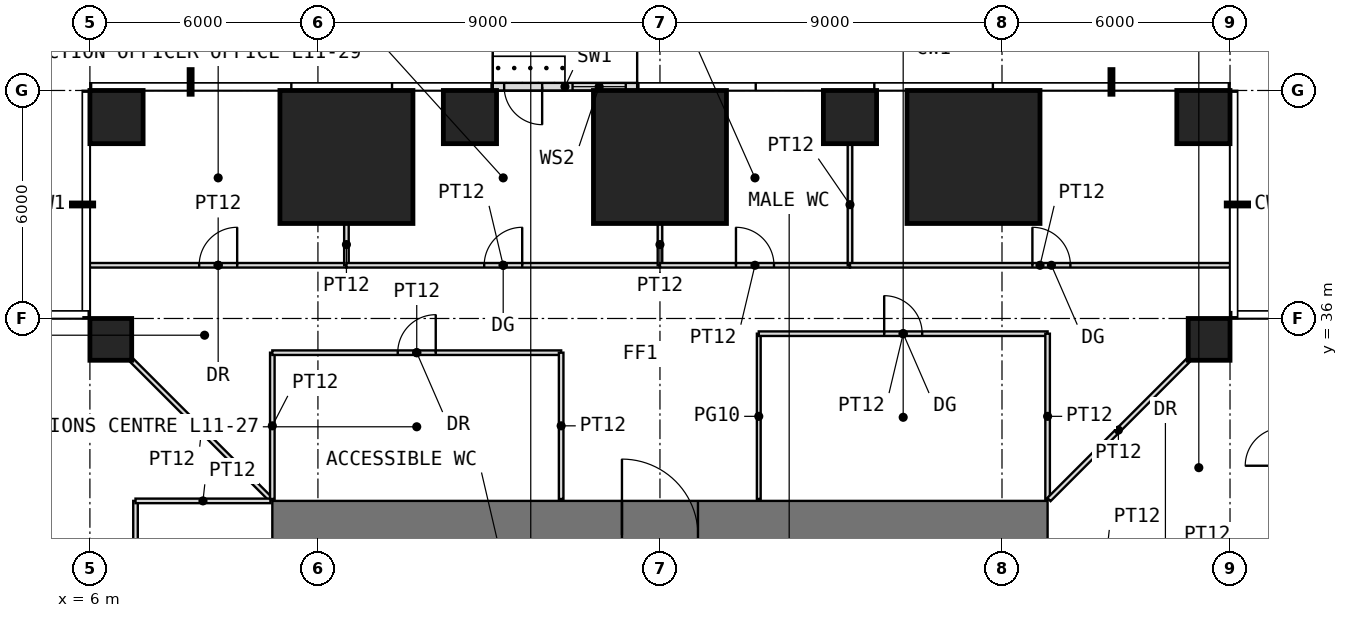
"""IFC4 building model, lengths in metres.
Left out: names, types, materials, properties, quantities, classifications, styles, units other than length and angle.
Written with IfcOpenShell. Run it as: python <this file> out.ifc"""

import sys

from ifc_helpers import new_model, si_unit, direction, frame, frame_2d, origin, origin_2d, place, context, subcontext, project, spatial, rectangle, extrude, element, fill, save


model = new_model("IFC4")
c1 = context("Model", 3, precision=1e-05, world=origin(), true_north=direction((0.0, 1.0)))
c2 = subcontext(c1, "Body", "Model", "MODEL_VIEW")
j1 = project(units=[si_unit("LENGTHUNIT", "METRE"), si_unit("PLANEANGLEUNIT", "RADIAN")], contexts=[c1])
p1 = place(None, origin())
s1 = spatial("IfcSite", under=j1, at=p1, CompositionType="ELEMENT")
p2 = place(p1, origin())
s2 = spatial("IfcBuilding", under=s1, at=p2, CompositionType="ELEMENT")
p3 = place(p2, frame((0.0, 0.0, 50.5)))
s3 = spatial("IfcBuildingStorey", under=s2, at=p3, CompositionType="ELEMENT", Elevation=50.5)
for number, where, z_axis, x_axis in (
    (1, (6.55, 35.45, 0.0), (0.0, 0.0, 1.0), (1.0, 0.0, 0.0)),
    (2, (35.45, 35.45, 0.0), (0.0, 0.0, 1.0), (1.0, 0.0, 0.0)),
):
    element("IfcColumn", number, at=place(p3, frame(where, z_axis=z_axis, x_axis=x_axis)), inside=s3, PredefinedType="COLUMN", context=c2, shape_type="SweptSolid", body=[
        extrude(rectangle(XDim=1.1, YDim=1.1, at=origin_2d()), origin(), (0.0, 0.0, 1.0), 4.0),
    ])
p4 = place(p3, frame((6.7, 41.3, 0.0), z_axis=(0.0, 0.0, 1.0), x_axis=(1.0, 0.0, 0.0)))
e3 = element("IfcColumn", 3, at=p4, inside=s3, PredefinedType="COLUMN", context=c2, shape_type="SweptSolid", body=[
    extrude(rectangle(XDim=1.4, YDim=1.4, at=origin_2d()), origin(), (0.0, 0.0, 1.0), 4.0),
])
p5 = place(p3, frame((12.75, 40.25, 0.0), z_axis=(0.0, 0.0, 1.0), x_axis=(1.0, 0.0, 0.0)))
e4 = element("IfcColumn", 4, at=p5, inside=s3, PredefinedType="COLUMN", context=c2, shape_type="SweptSolid", body=[
    extrude(rectangle(XDim=3.5, YDim=3.5, at=origin_2d()), origin(), (0.0, 0.0, 1.0), 4.0),
])
p6 = place(p3, frame((16.0, 41.3, 0.0), z_axis=(0.0, 0.0, 1.0), x_axis=(1.0, 0.0, 0.0)))
e5 = element("IfcColumn", 5, at=p6, inside=s3, PredefinedType="COLUMN", context=c2, shape_type="SweptSolid", body=[
    extrude(rectangle(XDim=1.4, YDim=1.4, at=origin_2d()), origin(), (0.0, 0.0, 1.0), 4.0),
])
p7 = place(p3, frame((21.0, 40.25, 0.0), z_axis=(0.0, 0.0, 1.0), x_axis=(1.0, 0.0, 0.0)))
e6 = element("IfcColumn", 6, at=p7, inside=s3, PredefinedType="COLUMN", context=c2, shape_type="SweptSolid", body=[
    extrude(rectangle(XDim=3.5, YDim=3.5, at=origin_2d()), origin(), (0.0, 0.0, 1.0), 4.0),
])
p8 = place(p3, frame((26.0, 41.3, 0.0), z_axis=(0.0, 0.0, 1.0), x_axis=(1.0, 0.0, 0.0)))
e7 = element("IfcColumn", 7, at=p8, inside=s3, PredefinedType="COLUMN", context=c2, shape_type="SweptSolid", body=[
    extrude(rectangle(XDim=1.4, YDim=1.4, at=origin_2d()), origin(), (0.0, 0.0, 1.0), 4.0),
])
p9 = place(p3, frame((29.25, 40.25, 0.0), z_axis=(0.0, 0.0, 1.0), x_axis=(1.0, 0.0, 0.0)))
e8 = element("IfcColumn", 8, at=p9, inside=s3, PredefinedType="COLUMN", context=c2, shape_type="SweptSolid", body=[
    extrude(rectangle(XDim=3.5, YDim=3.5, at=origin_2d()), origin(), (0.0, 0.0, 1.0), 4.0),
])
p10 = place(p3, frame((35.3, 41.3, 0.0), z_axis=(0.0, 0.0, 1.0), x_axis=(1.0, 0.0, 0.0)))
e9 = element("IfcColumn", 9, at=p10, inside=s3, PredefinedType="COLUMN", context=c2, shape_type="SweptSolid", body=[
    extrude(rectangle(XDim=1.4, YDim=1.4, at=origin_2d()), origin(), (0.0, 0.0, 1.0), 4.0),
])
p11 = place(p3, frame((20.4, 42.1, 0.0), z_axis=(0.0, 0.0, 1.0), x_axis=(-1.0, 0.0, 0.0)))
e10 = element("IfcWall", 10, at=p11, inside=s3, PredefinedType="USERDEFINED", context=c2, shape_type="SweptSolid", body=[
    extrude(rectangle(XDim=3.8, YDim=0.2, at=frame_2d((1.9, 0.0))), origin(), (0.0, 0.0, 1.0), 3.75),
])
p12 = place(p11, frame((2.5, 0.0, 0.0)))
e11 = element("IfcOpeningElement", 11, at=p12, cuts=e10, PredefinedType="OPENING", context=c2, shape_type="SweptSolid", body=[
    extrude(rectangle(XDim=1.0, YDim=2.4, at=frame_2d((0.5, 1.2))), frame((0.0, 0.11, 0.0), z_axis=(0.0, -1.0, 0.0), x_axis=(1.0, 0.0, 0.0)), (0.0, 0.0, 1.0), 0.22),
])
p13 = place(p11, frame((0.3, 0.0, 0.3)))
e12 = element("IfcOpeningElement", 12, at=p13, cuts=e10, PredefinedType="OPENING", context=c2, shape_type="SweptSolid", body=[
    extrude(rectangle(XDim=1.4, YDim=2.7, at=frame_2d((0.7, 1.35))), frame((0.0, 0.11, 0.0), z_axis=(0.0, -1.0, 0.0), x_axis=(1.0, 0.0, 0.0)), (0.0, 0.0, 1.0), 0.22),
])
p14 = place(p3, frame((10.8, 30.3, -0.05), z_axis=(0.0, 0.0, 1.0), x_axis=(1.0, 0.0, 0.0)))
e13 = element("IfcWall", 13, at=p14, inside=s3, PredefinedType="SHEAR", context=c2, shape_type="SweptSolid", body=[
    extrude(rectangle(XDim=20.4, YDim=1.8, at=frame_2d((10.2, 0.0))), origin(), (0.0, 0.0, 1.0), 4.0),
])
p15 = place(p14, frame((9.2, 0.0, 0.05)))
e14 = element("IfcOpeningElement", 14, at=p15, cuts=e13, PredefinedType="OPENING", context=c2, shape_type="SweptSolid", body=[
    extrude(rectangle(XDim=2.0, YDim=2.2, at=frame_2d((1.0, 1.1))), frame((0.0, 0.91, 0.0), z_axis=(0.0, -1.0, 0.0), x_axis=(1.0, 0.0, 0.0)), (0.0, 0.0, 1.0), 1.82),
])
p16 = place(p3, frame((6.0, 37.4, 0.0), z_axis=(0.0, 0.0, 1.0), x_axis=(1.0, 0.0, 0.0)))
e15 = element("IfcWall", 15, at=p16, inside=s3, PredefinedType="PARTITIONING", context=c2, shape_type="SweptSolid", body=[
    extrude(rectangle(XDim=6.75, YDim=0.12, at=frame_2d((3.375, 0.0))), origin(), (0.0, 0.0, 1.0), 3.75),
])
p17 = place(p16, frame((2.875, 0.0, 0.0)))
e16 = element("IfcOpeningElement", 16, at=p17, cuts=e15, PredefinedType="OPENING", context=c2, shape_type="SweptSolid", body=[
    extrude(rectangle(XDim=1.0, YDim=2.2, at=frame_2d((0.5, 1.1))), frame((0.0, 0.07, 0.0), z_axis=(0.0, -1.0, 0.0), x_axis=(1.0, 0.0, 0.0)), (0.0, 0.0, 1.0), 0.14),
])
p18 = place(p3, frame((7.11, 34.89, 0.0), z_axis=(0.0, 0.0, 1.0), x_axis=(0.707106781187, -0.707106781187, 0.0)))
e17 = element("IfcWall", 17, at=p18, inside=s3, PredefinedType="PARTITIONING", context=c2, shape_type="SweptSolid", body=[
    extrude(rectangle(XDim=5.168, YDim=0.12, at=frame_2d((2.584, 0.0))), origin(), (0.0, 0.0, 1.0), 3.75),
])
p19 = place(p3, frame((7.2, 24.6, 0.0), z_axis=(0.0, 0.0, 1.0), x_axis=(0.0, 1.0, 0.0)))
e18 = element("IfcWall", 18, at=p19, inside=s3, PredefinedType="PARTITIONING", context=c2, shape_type="SweptSolid", body=[
    extrude(rectangle(XDim=6.6, YDim=0.12, at=frame_2d((3.3, 0.0))), origin(), (0.0, 0.0, 1.0), 3.75),
])
p20 = place(p19, frame((2.8, 0.0, 0.0)))
e19 = element("IfcOpeningElement", 19, at=p20, cuts=e18, PredefinedType="OPENING", context=c2, shape_type="SweptSolid", body=[
    extrude(rectangle(XDim=1.0, YDim=2.4, at=frame_2d((0.5, 1.2))), frame((0.0, 0.07, 0.0), z_axis=(0.0, -1.0, 0.0), x_axis=(1.0, 0.0, 0.0)), (0.0, 0.0, 1.0), 0.14),
])
p21 = place(p3, frame((7.2, 31.2, 0.0), z_axis=(0.0, 0.0, 1.0), x_axis=(1.0, 0.0, 0.0)))
e20 = element("IfcWall", 20, at=p21, inside=s3, PredefinedType="PARTITIONING", context=c2, shape_type="SweptSolid", body=[
    extrude(rectangle(XDim=3.55, YDim=0.12, at=frame_2d((1.775, 0.0))), origin(), (0.0, 0.0, 1.0), 3.75),
])
p22 = place(p3, frame((10.8, 31.25, 0.0), z_axis=(0.0, 0.0, 1.0), x_axis=(0.0, 1.0, 0.0)))
e21 = element("IfcWall", 21, at=p22, inside=s3, PredefinedType="PARTITIONING", context=c2, shape_type="SweptSolid", body=[
    extrude(rectangle(XDim=3.85, YDim=0.12, at=frame_2d((1.925, 0.0))), origin(), (0.0, 0.0, 1.0), 3.75),
])
p23 = place(p3, frame((10.8, 35.1, 0.0), z_axis=(0.0, 0.0, 1.0), x_axis=(1.0, 0.0, 0.0)))
e22 = element("IfcWall", 22, at=p23, inside=s3, PredefinedType="PARTITIONING", context=c2, shape_type="SweptSolid", body=[
    extrude(rectangle(XDim=7.6, YDim=0.12, at=frame_2d((3.8, 0.0))), origin(), (0.0, 0.0, 1.0), 3.75),
])
p24 = place(p23, frame((3.3, 0.0, 0.0)))
e23 = element("IfcOpeningElement", 23, at=p24, cuts=e22, PredefinedType="OPENING", context=c2, shape_type="SweptSolid", body=[
    extrude(rectangle(XDim=1.0, YDim=2.2, at=frame_2d((0.5, 1.1))), frame((0.0, 0.07, 0.0), z_axis=(0.0, -1.0, 0.0), x_axis=(1.0, 0.0, 0.0)), (0.0, 0.0, 1.0), 0.14),
])
p25 = place(p3, frame((12.75, 37.4, 0.0), z_axis=(0.0, 0.0, 1.0), x_axis=(0.0, 1.0, 0.0)))
e24 = element("IfcWall", 24, at=p25, inside=s3, PredefinedType="PARTITIONING", context=c2, shape_type="SweptSolid", body=[
    extrude(rectangle(XDim=1.09, YDim=0.12, at=frame_2d((0.545, 0.0))), origin(), (0.0, 0.0, 1.0), 3.75),
])
p26 = place(p3, frame((12.75, 37.4, 0.0), z_axis=(0.0, 0.0, 1.0), x_axis=(1.0, 0.0, 0.0)))
e25 = element("IfcWall", 25, at=p26, inside=s3, PredefinedType="PARTITIONING", context=c2, shape_type="SweptSolid", body=[
    extrude(rectangle(XDim=8.25, YDim=0.12, at=frame_2d((4.125, 0.0))), origin(), (0.0, 0.0, 1.0), 3.75),
])
p27 = place(p26, frame((3.625, 0.0, 0.0)))
e26 = element("IfcOpeningElement", 26, at=p27, cuts=e25, PredefinedType="OPENING", context=c2, shape_type="SweptSolid", body=[
    extrude(rectangle(XDim=1.0, YDim=2.4, at=frame_2d((0.5, 1.2))), frame((0.0, 0.07, 0.0), z_axis=(0.0, -1.0, 0.0), x_axis=(1.0, 0.0, 0.0)), (0.0, 0.0, 1.0), 0.14),
])
p28 = place(p3, frame((18.4, 31.25, 0.0), z_axis=(0.0, 0.0, 1.0), x_axis=(0.0, 1.0, 0.0)))
e27 = element("IfcWall", 27, at=p28, inside=s3, PredefinedType="PARTITIONING", context=c2, shape_type="SweptSolid", body=[
    extrude(rectangle(XDim=3.85, YDim=0.12, at=frame_2d((1.925, 0.0))), origin(), (0.0, 0.0, 1.0), 3.75),
])
p29 = place(p3, frame((21.0, 37.4, 0.0), z_axis=(0.0, 0.0, 1.0), x_axis=(0.0, 1.0, 0.0)))
e28 = element("IfcWall", 28, at=p29, inside=s3, PredefinedType="PARTITIONING", context=c2, shape_type="SweptSolid", body=[
    extrude(rectangle(XDim=1.09, YDim=0.12, at=frame_2d((0.545, 0.0))), origin(), (0.0, 0.0, 1.0), 3.75),
])
p30 = place(p3, frame((21.0, 37.4, 0.0), z_axis=(0.0, 0.0, 1.0), x_axis=(1.0, 0.0, 0.0)))
e29 = element("IfcWall", 29, at=p30, inside=s3, PredefinedType="PARTITIONING", context=c2, shape_type="SweptSolid", body=[
    extrude(rectangle(XDim=5.0, YDim=0.12, at=frame_2d((2.5, 0.0))), origin(), (0.0, 0.0, 1.0), 3.75),
])
p31 = place(p30, frame((2.0, 0.0, 0.0)))
e30 = element("IfcOpeningElement", 30, at=p31, cuts=e29, PredefinedType="OPENING", context=c2, shape_type="SweptSolid", body=[
    extrude(rectangle(XDim=1.0, YDim=2.2, at=frame_2d((0.5, 1.1))), frame((0.0, 0.07, 0.0), z_axis=(0.0, -1.0, 0.0), x_axis=(1.0, 0.0, 0.0)), (0.0, 0.0, 1.0), 0.14),
])
p32 = place(p3, frame((23.6, 31.25, 0.0), z_axis=(0.0, 0.0, 1.0), x_axis=(0.0, 1.0, 0.0)))
e31 = element("IfcWall", 31, at=p32, inside=s3, PredefinedType="PARTITIONING", context=c2, shape_type="SweptSolid", body=[
    extrude(rectangle(XDim=4.35, YDim=0.1, at=frame_2d((2.175, 0.0))), origin(), (0.0, 0.0, 1.0), 3.75),
])
p33 = place(p3, frame((23.6, 35.6, 0.0), z_axis=(0.0, 0.0, 1.0), x_axis=(1.0, 0.0, 0.0)))
e32 = element("IfcWall", 32, at=p33, inside=s3, PredefinedType="PARTITIONING", context=c2, shape_type="SweptSolid", body=[
    extrude(rectangle(XDim=7.6, YDim=0.12, at=frame_2d((3.8, 0.0))), origin(), (0.0, 0.0, 1.0), 3.75),
])
p34 = place(p33, frame((3.3, 0.0, 0.0)))
e33 = element("IfcOpeningElement", 33, at=p34, cuts=e32, PredefinedType="OPENING", context=c2, shape_type="SweptSolid", body=[
    extrude(rectangle(XDim=1.0, YDim=2.4, at=frame_2d((0.5, 1.2))), frame((0.0, 0.07, 0.0), z_axis=(0.0, -1.0, 0.0), x_axis=(1.0, 0.0, 0.0)), (0.0, 0.0, 1.0), 0.14),
])
p35 = place(p3, frame((26.0, 37.4, 0.0), z_axis=(0.0, 0.0, 1.0), x_axis=(0.0, 1.0, 0.0)))
e34 = element("IfcWall", 34, at=p35, inside=s3, PredefinedType="PARTITIONING", context=c2, shape_type="SweptSolid", body=[
    extrude(rectangle(XDim=3.19, YDim=0.12, at=frame_2d((1.595, 0.0))), origin(), (0.0, 0.0, 1.0), 3.75),
])
p36 = place(p3, frame((26.0, 37.4, 0.0), z_axis=(0.0, 0.0, 1.0), x_axis=(1.0, 0.0, 0.0)))
e35 = element("IfcWall", 35, at=p36, inside=s3, PredefinedType="PARTITIONING", context=c2, shape_type="SweptSolid", body=[
    extrude(rectangle(XDim=10.0, YDim=0.12, at=frame_2d((5.0, 0.0))), origin(), (0.0, 0.0, 1.0), 3.75),
])
p37 = place(p36, frame((4.8, 0.0, 0.0)))
e36 = element("IfcOpeningElement", 36, at=p37, cuts=e35, PredefinedType="OPENING", context=c2, shape_type="SweptSolid", body=[
    extrude(rectangle(XDim=1.0, YDim=2.4, at=frame_2d((0.5, 1.2))), frame((0.0, 0.07, 0.0), z_axis=(0.0, -1.0, 0.0), x_axis=(1.0, 0.0, 0.0)), (0.0, 0.0, 1.0), 0.14),
])
p38 = place(p3, frame((31.2, 31.25, 0.0), z_axis=(0.0, 0.0, 1.0), x_axis=(0.0, 1.0, 0.0)))
e37 = element("IfcWall", 37, at=p38, inside=s3, PredefinedType="PARTITIONING", context=c2, shape_type="SweptSolid", body=[
    extrude(rectangle(XDim=4.35, YDim=0.12, at=frame_2d((2.175, 0.0))), origin(), (0.0, 0.0, 1.0), 3.75),
])
p39 = place(p3, frame((31.235, 31.235, 0.0), z_axis=(0.0, 0.0, 1.0), x_axis=(0.707106781187, 0.707106781187, 0.0)))
e38 = element("IfcWall", 38, at=p39, inside=s3, PredefinedType="PARTITIONING", context=c2, shape_type="SweptSolid", body=[
    extrude(rectangle(XDim=5.168, YDim=0.12, at=frame_2d((2.584, 0.0))), origin(), (0.0, 0.0, 1.0), 3.75),
])
p40 = place(p12, origin())
e39 = element("IfcDoor", 39, at=p40, inside=s3, OperationType="SINGLE_SWING_LEFT", PredefinedType="DOOR", context=c2, shape_type="SweptSolid", body=[
    extrude(rectangle(XDim=1.0, YDim=2.4, at=frame_2d((0.5, 1.2))), frame((0.0, 0.025, 0.0), z_axis=(0.0, -1.0, 0.0), x_axis=(1.0, 0.0, 0.0)), (0.0, 0.0, 1.0), 0.05),
])
fill(e11, e39)
p41 = place(p13, origin())
e40 = element("IfcWindow", 40, at=p41, inside=s3, PartitioningType="SINGLE_PANEL", PredefinedType="WINDOW", context=c2, shape_type="SweptSolid", body=[
    extrude(rectangle(XDim=1.4, YDim=2.7, at=frame_2d((0.7, 1.35))), frame((0.0, 0.03, 0.0), z_axis=(0.0, -1.0, 0.0), x_axis=(1.0, 0.0, 0.0)), (0.0, 0.0, 1.0), 0.06),
])
fill(e12, e40)
p42 = place(p15, origin())
e41 = element("IfcDoor", 41, at=p42, inside=s3, OperationType="DOUBLE_DOOR_SINGLE_SWING", PredefinedType="DOOR", context=c2, shape_type="SweptSolid", body=[
    extrude(rectangle(XDim=2.0, YDim=2.2, at=frame_2d((1.0, 1.1))), frame((0.0, 0.025, 0.0), z_axis=(0.0, -1.0, 0.0), x_axis=(1.0, 0.0, 0.0)), (0.0, 0.0, 1.0), 0.05),
])
fill(e14, e41)
p43 = place(p24, origin())
e42 = element("IfcDoor", 42, at=p43, inside=s3, OperationType="SINGLE_SWING_RIGHT", PredefinedType="DOOR", context=c2, shape_type="SweptSolid", body=[
    extrude(rectangle(XDim=1.0, YDim=2.2, at=frame_2d((0.5, 1.1))), frame((0.0, 0.025, 0.0), z_axis=(0.0, -1.0, 0.0), x_axis=(1.0, 0.0, 0.0)), (0.0, 0.0, 1.0), 0.05),
])
fill(e23, e42)
p44 = place(p34, origin())
e43 = element("IfcDoor", 43, at=p44, inside=s3, OperationType="SINGLE_SWING_LEFT", PredefinedType="DOOR", context=c2, shape_type="SweptSolid", body=[
    extrude(rectangle(XDim=1.0, YDim=2.4, at=frame_2d((0.5, 1.2))), frame((0.0, 0.025, 0.0), z_axis=(0.0, -1.0, 0.0), x_axis=(1.0, 0.0, 0.0)), (0.0, 0.0, 1.0), 0.05),
])
fill(e33, e43)
p45 = place(p17, origin())
e44 = element("IfcDoor", 44, at=p45, inside=s3, OperationType="SINGLE_SWING_RIGHT", PredefinedType="DOOR", context=c2, shape_type="SweptSolid", body=[
    extrude(rectangle(XDim=1.0, YDim=2.2, at=frame_2d((0.5, 1.1))), frame((0.0, 0.025, 0.0), z_axis=(0.0, -1.0, 0.0), x_axis=(1.0, 0.0, 0.0)), (0.0, 0.0, 1.0), 0.05),
])
fill(e16, e44)
p46 = place(p31, origin())
e45 = element("IfcDoor", 45, at=p46, inside=s3, OperationType="SINGLE_SWING_LEFT", PredefinedType="DOOR", context=c2, shape_type="SweptSolid", body=[
    extrude(rectangle(XDim=1.0, YDim=2.2, at=frame_2d((0.5, 1.1))), frame((0.0, 0.025, 0.0), z_axis=(0.0, -1.0, 0.0), x_axis=(1.0, 0.0, 0.0)), (0.0, 0.0, 1.0), 0.05),
])
fill(e30, e45)
p47 = place(p27, origin())
e46 = element("IfcDoor", 46, at=p47, inside=s3, OperationType="SINGLE_SWING_RIGHT", PredefinedType="DOOR", context=c2, shape_type="SweptSolid", body=[
    extrude(rectangle(XDim=1.0, YDim=2.4, at=frame_2d((0.5, 1.2))), frame((0.0, 0.025, 0.0), z_axis=(0.0, -1.0, 0.0), x_axis=(1.0, 0.0, 0.0)), (0.0, 0.0, 1.0), 0.05),
])
fill(e26, e46)
p48 = place(p37, origin())
e47 = element("IfcDoor", 47, at=p48, inside=s3, OperationType="SINGLE_SWING_LEFT", PredefinedType="DOOR", context=c2, shape_type="SweptSolid", body=[
    extrude(rectangle(XDim=1.0, YDim=2.4, at=frame_2d((0.5, 1.2))), frame((0.0, 0.025, 0.0), z_axis=(0.0, -1.0, 0.0), x_axis=(1.0, 0.0, 0.0)), (0.0, 0.0, 1.0), 0.05),
])
fill(e36, e47)
save(model, sys.argv[1])
